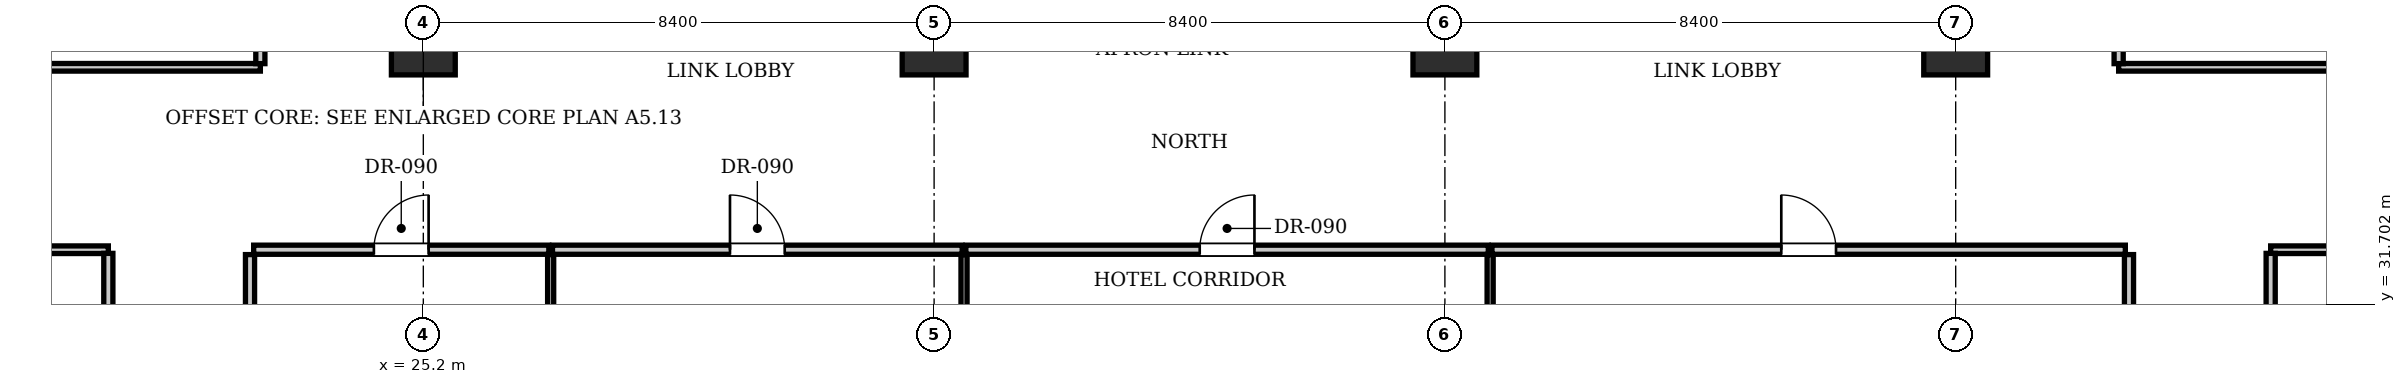
"""IFC4 building model, lengths in metres.
Left out: names, types, materials, properties, quantities, classifications, styles, units other than length and angle.
Written with IfcOpenShell. Run it as: python <this file> out.ifc"""

import sys

from ifc_helpers import new_model, si_unit, direction, frame, frame_2d, origin, origin_2d, place, context, subcontext, project, spatial, rectangle, extrude, element, fill, save


model = new_model("IFC4")
c1 = context("Model", 3, precision=1e-05, world=origin(), true_north=direction((0.0, 1.0)))
c2 = subcontext(c1, "Body", "Model", "MODEL_VIEW")
j1 = project(units=[si_unit("LENGTHUNIT", "METRE"), si_unit("PLANEANGLEUNIT", "RADIAN")], contexts=[c1])
p1 = place(None, origin())
s1 = spatial("IfcSite", under=j1, at=p1, CompositionType="ELEMENT")
p2 = place(p1, origin())
s2 = spatial("IfcBuilding", under=s1, at=p2, CompositionType="ELEMENT")
p3 = place(p2, frame((0.0, 0.0, 73.15)))
s3 = spatial("IfcBuildingStorey", under=s2, at=p3, CompositionType="ELEMENT", Elevation=73.15)
for number, where, z_axis, x_axis in (
    (1, (25.2, 36.0, 0.0), (0.0, 0.0, 1.0), (1.0, 0.0, 0.0)),
    (2, (33.6, 36.0, 0.0), (0.0, 0.0, 1.0), (1.0, 0.0, 0.0)),
    (3, (42.0, 36.0, 0.0), (0.0, 0.0, 1.0), (1.0, 0.0, 0.0)),
    (4, (50.4, 36.0, 0.0), (0.0, 0.0, 1.0), (1.0, 0.0, 0.0)),
):
    element("IfcColumn", number, at=place(p3, frame(where, z_axis=z_axis, x_axis=x_axis)), inside=s3, PredefinedType="COLUMN", context=c2, shape_type="SweptSolid", body=[
        extrude(rectangle(XDim=1.05, YDim=1.05, at=origin_2d()), origin(), (0.0, 0.0, 1.0), 3.85),
    ])
for number, where, z_axis, x_axis in (
    (5, (22.35, 24.19, 0.0), (0.0, 0.0, 1.0), (0.0, 1.0, 0.0)),
    (6, (53.25, 24.19, 0.0), (0.0, 0.0, 1.0), (0.0, 1.0, 0.0)),
):
    element("IfcWall", number, at=place(p3, frame(where, z_axis=z_axis, x_axis=x_axis)), inside=s3, PredefinedType="PARTITIONING", context=c2, shape_type="SweptSolid", body=[
        extrude(rectangle(XDim=8.33, YDim=0.15, at=frame_2d((4.165, 0.0))), origin(), (0.0, 0.0, 1.0), 3.61),
    ])
p4 = place(p3, frame((22.41, 32.6, 0.0), z_axis=(0.0, 0.0, 1.0), x_axis=(1.0, 0.0, 0.0)))
e7 = element("IfcWall", 7, at=p4, inside=s3, PredefinedType="PARTITIONING", context=c2, shape_type="SweptSolid", body=[
    extrude(rectangle(XDim=4.854, YDim=0.15, at=frame_2d((2.427, 0.0))), origin(), (0.0, 0.0, 1.0), 3.61),
])
p5 = place(p4, frame((1.977, 0.0, 0.0)))
e8 = element("IfcOpeningElement", 8, at=p5, cuts=e7, PredefinedType="OPENING", context=c2, shape_type="SweptSolid", body=[
    extrude(rectangle(XDim=0.9, YDim=2.1, at=frame_2d((0.45, 1.05))), frame((0.0, 0.085, 0.0), z_axis=(0.0, -1.0, 0.0), x_axis=(1.0, 0.0, 0.0)), (0.0, 0.0, 1.0), 0.17),
])
p6 = place(p3, frame((27.294, 24.19, 0.0), z_axis=(0.0, 0.0, 1.0), x_axis=(0.0, 1.0, 0.0)))
e9 = element("IfcWall", 9, at=p6, inside=s3, PredefinedType="PARTITIONING", context=c2, shape_type="SweptSolid", body=[
    extrude(rectangle(XDim=8.33, YDim=0.1, at=frame_2d((4.165, 0.0))), origin(), (0.0, 0.0, 1.0), 3.61),
])
p7 = place(p3, frame((27.324, 32.6, 0.0), z_axis=(0.0, 0.0, 1.0), x_axis=(1.0, 0.0, 0.0)))
e10 = element("IfcWall", 10, at=p7, inside=s3, PredefinedType="PARTITIONING", context=c2, shape_type="SweptSolid", body=[
    extrude(rectangle(XDim=6.738, YDim=0.15, at=frame_2d((3.369, 0.0))), origin(), (0.0, 0.0, 1.0), 3.61),
])
p8 = place(p7, frame((2.919, 0.0, 0.0)))
e11 = element("IfcOpeningElement", 11, at=p8, cuts=e10, PredefinedType="OPENING", context=c2, shape_type="SweptSolid", body=[
    extrude(rectangle(XDim=0.9, YDim=2.1, at=frame_2d((0.45, 1.05))), frame((0.0, 0.085, 0.0), z_axis=(0.0, -1.0, 0.0), x_axis=(1.0, 0.0, 0.0)), (0.0, 0.0, 1.0), 0.17),
])
p9 = place(p3, frame((34.092, 24.19, 0.0), z_axis=(0.0, 0.0, 1.0), x_axis=(0.0, 1.0, 0.0)))
e12 = element("IfcWall", 12, at=p9, inside=s3, PredefinedType="PARTITIONING", context=c2, shape_type="SweptSolid", body=[
    extrude(rectangle(XDim=8.33, YDim=0.1, at=frame_2d((4.165, 0.0))), origin(), (0.0, 0.0, 1.0), 3.61),
])
p10 = place(p3, frame((34.122, 32.6, 0.0), z_axis=(0.0, 0.0, 1.0), x_axis=(1.0, 0.0, 0.0)))
e13 = element("IfcWall", 13, at=p10, inside=s3, PredefinedType="PARTITIONING", context=c2, shape_type="SweptSolid", body=[
    extrude(rectangle(XDim=8.592, YDim=0.15, at=frame_2d((4.296, 0.0))), origin(), (0.0, 0.0, 1.0), 3.61),
])
p11 = place(p10, frame((3.846, 0.0, 0.0)))
e14 = element("IfcOpeningElement", 14, at=p11, cuts=e13, PredefinedType="OPENING", context=c2, shape_type="SweptSolid", body=[
    extrude(rectangle(XDim=0.9, YDim=2.1, at=frame_2d((0.45, 1.05))), frame((0.0, 0.085, 0.0), z_axis=(0.0, -1.0, 0.0), x_axis=(1.0, 0.0, 0.0)), (0.0, 0.0, 1.0), 0.17),
])
p12 = place(p3, frame((42.744, 24.19, 0.0), z_axis=(0.0, 0.0, 1.0), x_axis=(0.0, 1.0, 0.0)))
e15 = element("IfcWall", 15, at=p12, inside=s3, PredefinedType="PARTITIONING", context=c2, shape_type="SweptSolid", body=[
    extrude(rectangle(XDim=8.33, YDim=0.1, at=frame_2d((4.165, 0.0))), origin(), (0.0, 0.0, 1.0), 3.61),
])
p13 = place(p3, frame((42.774, 32.6, 0.0), z_axis=(0.0, 0.0, 1.0), x_axis=(1.0, 0.0, 0.0)))
e16 = element("IfcWall", 16, at=p13, inside=s3, PredefinedType="PARTITIONING", context=c2, shape_type="SweptSolid", body=[
    extrude(rectangle(XDim=10.416, YDim=0.15, at=frame_2d((5.208, 0.0))), origin(), (0.0, 0.0, 1.0), 3.61),
])
p14 = place(p13, frame((4.758, 0.0, 0.0)))
e17 = element("IfcOpeningElement", 17, at=p14, cuts=e16, PredefinedType="OPENING", context=c2, shape_type="SweptSolid", body=[
    extrude(rectangle(XDim=0.9, YDim=2.1, at=frame_2d((0.45, 1.05))), frame((0.0, 0.085, 0.0), z_axis=(0.0, -1.0, 0.0), x_axis=(1.0, 0.0, 0.0)), (0.0, 0.0, 1.0), 0.17),
])
p15 = place(p3, frame((10.9, 32.6, 0.0), z_axis=(0.0, 0.0, 1.0), x_axis=(1.0, 0.0, 0.0)))
e18 = element("IfcWall", 18, at=p15, inside=s3, PredefinedType="PARTITIONING", context=c2, shape_type="SweptSolid", body=[
    extrude(rectangle(XDim=9.12, YDim=0.125, at=frame_2d((4.56, 0.0))), origin(), (0.0, 0.0, 1.0), 3.61),
])
p16 = place(p3, frame((55.58, 32.6, 0.0), z_axis=(0.0, 0.0, 1.0), x_axis=(1.0, 0.0, 0.0)))
e19 = element("IfcWall", 19, at=p16, inside=s3, PredefinedType="PARTITIONING", context=c2, shape_type="SweptSolid", body=[
    extrude(rectangle(XDim=9.12, YDim=0.125, at=frame_2d((4.56, 0.0))), origin(), (0.0, 0.0, 1.0), 3.61),
])
for number, where, z_axis, x_axis in (
    (20, (20.02, 30.25, 0.0), (0.0, 0.0, 1.0), (0.0, 1.0, 0.0)),
    (21, (55.58, 30.25, 0.0), (0.0, 0.0, 1.0), (0.0, 1.0, 0.0)),
):
    element("IfcWall", number, at=place(p3, frame(where, z_axis=z_axis, x_axis=x_axis)), inside=s3, PredefinedType="PARTITIONING", context=c2, shape_type="SweptSolid", body=[
        extrude(rectangle(XDim=2.29, YDim=0.15, at=frame_2d((1.145, 0.0))), origin(), (0.0, 0.0, 1.0), 3.61),
    ])
p17 = place(p3, frame((10.9, 35.6, 0.0), z_axis=(0.0, 0.0, 1.0), x_axis=(1.0, 0.0, 0.0)))
e22 = element("IfcWall", 22, at=p17, inside=s3, PredefinedType="PARTITIONING", context=c2, shape_type="SweptSolid", body=[
    extrude(rectangle(XDim=11.62, YDim=0.125, at=frame_2d((5.81, 0.0))), origin(), (0.0, 0.0, 1.0), 3.61),
])
p18 = place(p3, frame((53.08, 35.6, 0.0), z_axis=(0.0, 0.0, 1.0), x_axis=(1.0, 0.0, 0.0)))
e23 = element("IfcWall", 23, at=p18, inside=s3, PredefinedType="PARTITIONING", context=c2, shape_type="SweptSolid", body=[
    extrude(rectangle(XDim=11.62, YDim=0.125, at=frame_2d((5.81, 0.0))), origin(), (0.0, 0.0, 1.0), 3.61),
])
p19 = place(p3, frame((22.52, 35.66, 0.0), z_axis=(0.0, 0.0, 1.0), x_axis=(0.0, 1.0, 0.0)))
e24 = element("IfcWall", 24, at=p19, inside=s3, PredefinedType="PARTITIONING", context=c2, shape_type="SweptSolid", body=[
    extrude(rectangle(XDim=12.328, YDim=0.15, at=frame_2d((6.164, 0.0))), origin(), (0.0, 0.0, 1.0), 3.61),
])
p20 = place(p19, frame((5.689, 0.0, 0.0)))
e25 = element("IfcOpeningElement", 25, at=p20, cuts=e24, PredefinedType="OPENING", context=c2, shape_type="SweptSolid", body=[
    extrude(rectangle(XDim=0.95, YDim=2.15, at=frame_2d((0.475, 1.075))), frame((0.0, 0.085, 0.0), z_axis=(0.0, -1.0, 0.0), x_axis=(1.0, 0.0, 0.0)), (0.0, 0.0, 1.0), 0.17),
])
p21 = place(p3, frame((53.08, 35.66, 0.0), z_axis=(0.0, 0.0, 1.0), x_axis=(0.0, 1.0, 0.0)))
e26 = element("IfcWall", 26, at=p21, inside=s3, PredefinedType="PARTITIONING", context=c2, shape_type="SweptSolid", body=[
    extrude(rectangle(XDim=12.328, YDim=0.15, at=frame_2d((6.164, 0.0))), origin(), (0.0, 0.0, 1.0), 3.61),
])
p22 = place(p21, frame((5.689, 0.0, 0.0)))
e27 = element("IfcOpeningElement", 27, at=p22, cuts=e26, PredefinedType="OPENING", context=c2, shape_type="SweptSolid", body=[
    extrude(rectangle(XDim=0.95, YDim=2.15, at=frame_2d((0.475, 1.075))), frame((0.0, 0.085, 0.0), z_axis=(0.0, -1.0, 0.0), x_axis=(1.0, 0.0, 0.0)), (0.0, 0.0, 1.0), 0.17),
])
p23 = place(p5, origin())
e28 = element("IfcDoor", 28, at=p23, inside=s3, OperationType="SINGLE_SWING_RIGHT", PredefinedType="DOOR", context=c2, shape_type="SweptSolid", body=[
    extrude(rectangle(XDim=0.9, YDim=2.1, at=frame_2d((0.45, 1.05))), frame((0.0, 0.025, 0.0), z_axis=(0.0, -1.0, 0.0), x_axis=(1.0, 0.0, 0.0)), (0.0, 0.0, 1.0), 0.05),
])
fill(e8, e28)
p24 = place(p8, origin())
e29 = element("IfcDoor", 29, at=p24, inside=s3, OperationType="SINGLE_SWING_LEFT", PredefinedType="DOOR", context=c2, shape_type="SweptSolid", body=[
    extrude(rectangle(XDim=0.9, YDim=2.1, at=frame_2d((0.45, 1.05))), frame((0.0, 0.025, 0.0), z_axis=(0.0, -1.0, 0.0), x_axis=(1.0, 0.0, 0.0)), (0.0, 0.0, 1.0), 0.05),
])
fill(e11, e29)
p25 = place(p11, origin())
e30 = element("IfcDoor", 30, at=p25, inside=s3, OperationType="SINGLE_SWING_RIGHT", PredefinedType="DOOR", context=c2, shape_type="SweptSolid", body=[
    extrude(rectangle(XDim=0.9, YDim=2.1, at=frame_2d((0.45, 1.05))), frame((0.0, 0.025, 0.0), z_axis=(0.0, -1.0, 0.0), x_axis=(1.0, 0.0, 0.0)), (0.0, 0.0, 1.0), 0.05),
])
fill(e14, e30)
p26 = place(p14, origin())
e31 = element("IfcDoor", 31, at=p26, inside=s3, OperationType="SINGLE_SWING_LEFT", PredefinedType="DOOR", context=c2, shape_type="SweptSolid", body=[
    extrude(rectangle(XDim=0.9, YDim=2.1, at=frame_2d((0.45, 1.05))), frame((0.0, 0.025, 0.0), z_axis=(0.0, -1.0, 0.0), x_axis=(1.0, 0.0, 0.0)), (0.0, 0.0, 1.0), 0.05),
])
fill(e17, e31)
save(model, sys.argv[1])
